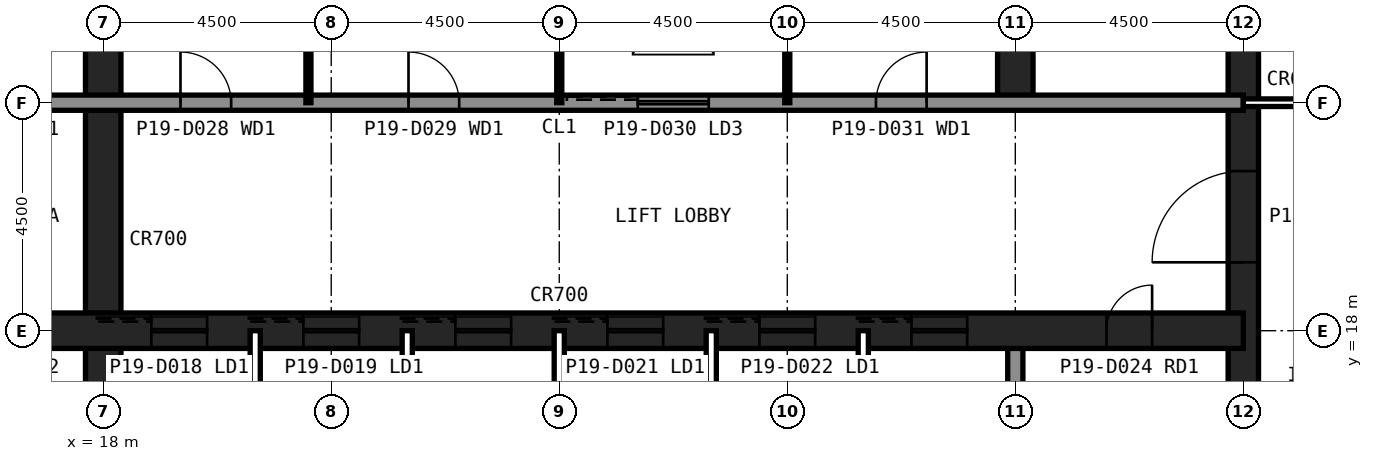
"""IFC4 building model, lengths in metres.
Left out: names, types, materials, properties, quantities, classifications, styles, units other than length and angle.
Written with IfcOpenShell. Run it as: python <this file> out.ifc"""

import sys

from ifc_helpers import new_model, si_unit, direction, frame, frame_2d, origin, place, context, subcontext, project, spatial, rectangle, extrude, element, fill, save


model = new_model("IFC4")
c1 = context("Model", 3, precision=1e-05, world=origin(), true_north=direction((0.0, 1.0)))
c2 = subcontext(c1, "Body", "Model", "MODEL_VIEW")
j1 = project(units=[si_unit("LENGTHUNIT", "METRE"), si_unit("PLANEANGLEUNIT", "RADIAN")], contexts=[c1])
p1 = place(None, origin())
s1 = spatial("IfcSite", under=j1, at=p1, CompositionType="ELEMENT")
p2 = place(p1, origin())
s2 = spatial("IfcBuilding", under=s1, at=p2, CompositionType="ELEMENT")
p3 = place(p2, frame((0.0, 0.0, 79.4)))
s3 = spatial("IfcBuildingStorey", under=s2, at=p3, CompositionType="ELEMENT", Elevation=79.4)
p4 = place(p3, frame((40.5, 13.5, 0.0), z_axis=(0.0, 0.0, 1.0), x_axis=(0.0, 1.0, 0.0)))
e1 = element("IfcWall", 1, at=p4, inside=s3, PredefinedType="SHEAR", context=c2, shape_type="SweptSolid", body=[
    extrude(rectangle(XDim=27.0, YDim=0.6, at=frame_2d((13.5, 0.0))), origin(), (0.0, 0.0, 1.0), 4.2),
])
p5 = place(p4, frame((5.85, 0.0, 0.0)))
e2 = element("IfcOpeningElement", 2, at=p5, cuts=e1, PredefinedType="OPENING", context=c2, shape_type="SweptSolid", body=[
    extrude(rectangle(XDim=1.8, YDim=2.1, at=frame_2d((0.9, 1.05))), frame((0.0, 0.31, 0.0), z_axis=(0.0, -1.0, 0.0), x_axis=(1.0, 0.0, 0.0)), (0.0, 0.0, 1.0), 0.62),
])
p6 = place(p4, frame((19.65, 0.0, 0.0)))
e3 = element("IfcOpeningElement", 3, at=p6, cuts=e1, PredefinedType="OPENING", context=c2, shape_type="SweptSolid", body=[
    extrude(rectangle(XDim=1.2, YDim=2.1, at=frame_2d((0.6, 1.05))), frame((0.0, 0.31, 0.0), z_axis=(0.0, -1.0, 0.0), x_axis=(1.0, 0.0, 0.0)), (0.0, 0.0, 1.0), 0.62),
])
p7 = place(p3, frame((18.0, 13.5, 0.0), z_axis=(0.0, 0.0, 1.0), x_axis=(0.0, 1.0, 0.0)))
e4 = element("IfcWall", 4, at=p7, inside=s3, PredefinedType="SHEAR", context=c2, shape_type="SweptSolid", body=[
    extrude(rectangle(XDim=18.0, YDim=0.7, at=frame_2d((9.0, 0.0))), origin(), (0.0, 0.0, 1.0), 4.2),
])
p8 = place(p3, frame((36.0, 13.5, 0.0), z_axis=(0.0, 0.0, 1.0), x_axis=(0.0, 1.0, 0.0)))
e5 = element("IfcWall", 5, at=p8, inside=s3, PredefinedType="SOLIDWALL", context=c2, shape_type="SweptSolid", body=[
    extrude(rectangle(XDim=4.5, YDim=0.3, at=frame_2d((2.25, 0.0))), origin(), (0.0, 0.0, 1.0), 4.04),
])
p9 = place(p3, frame((36.0, 22.5, 0.0), z_axis=(0.0, 0.0, 1.0), x_axis=(0.0, 1.0, 0.0)))
e6 = element("IfcWall", 6, at=p9, inside=s3, PredefinedType="SHEAR", context=c2, shape_type="SweptSolid", body=[
    extrude(rectangle(XDim=18.0, YDim=0.7, at=frame_2d((9.0, 0.0))), origin(), (0.0, 0.0, 1.0), 4.2),
])
p10 = place(p3, frame((13.5, 18.0, 0.0), z_axis=(0.0, 0.0, 1.0), x_axis=(1.0, 0.0, 0.0)))
e7 = element("IfcWall", 7, at=p10, inside=s3, PredefinedType="SHEAR", context=c2, shape_type="SweptSolid", body=[
    extrude(rectangle(XDim=27.0, YDim=0.7, at=frame_2d((13.5, 0.0))), origin(), (0.0, 0.0, 1.0), 4.2),
])
p11 = place(p10, frame((24.3, 0.0, 0.0)))
e8 = element("IfcOpeningElement", 8, at=p11, cuts=e7, PredefinedType="OPENING", context=c2, shape_type="SweptSolid", body=[
    extrude(rectangle(XDim=0.9, YDim=2.1, at=frame_2d((0.45, 1.05))), frame((0.0, 0.36, 0.0), z_axis=(0.0, -1.0, 0.0), x_axis=(1.0, 0.0, 0.0)), (0.0, 0.0, 1.0), 0.72),
])
p12 = place(p10, frame((5.45, 0.0, 0.0)))
e9 = element("IfcOpeningElement", 9, at=p12, cuts=e7, PredefinedType="OPENING", context=c2, shape_type="SweptSolid", body=[
    extrude(rectangle(XDim=1.1, YDim=2.1, at=frame_2d((0.55, 1.05))), frame((0.0, 0.36, 0.0), z_axis=(0.0, -1.0, 0.0), x_axis=(1.0, 0.0, 0.0)), (0.0, 0.0, 1.0), 0.72),
])
p13 = place(p10, frame((8.45, 0.0, 0.0)))
e10 = element("IfcOpeningElement", 10, at=p13, cuts=e7, PredefinedType="OPENING", context=c2, shape_type="SweptSolid", body=[
    extrude(rectangle(XDim=1.1, YDim=2.1, at=frame_2d((0.55, 1.05))), frame((0.0, 0.36, 0.0), z_axis=(0.0, -1.0, 0.0), x_axis=(1.0, 0.0, 0.0)), (0.0, 0.0, 1.0), 0.72),
])
p14 = place(p10, frame((11.45, 0.0, 0.0)))
e11 = element("IfcOpeningElement", 11, at=p14, cuts=e7, PredefinedType="OPENING", context=c2, shape_type="SweptSolid", body=[
    extrude(rectangle(XDim=1.1, YDim=2.1, at=frame_2d((0.55, 1.05))), frame((0.0, 0.36, 0.0), z_axis=(0.0, -1.0, 0.0), x_axis=(1.0, 0.0, 0.0)), (0.0, 0.0, 1.0), 0.72),
])
p15 = place(p10, frame((14.45, 0.0, 0.0)))
e12 = element("IfcOpeningElement", 12, at=p15, cuts=e7, PredefinedType="OPENING", context=c2, shape_type="SweptSolid", body=[
    extrude(rectangle(XDim=1.1, YDim=2.1, at=frame_2d((0.55, 1.05))), frame((0.0, 0.36, 0.0), z_axis=(0.0, -1.0, 0.0), x_axis=(1.0, 0.0, 0.0)), (0.0, 0.0, 1.0), 0.72),
])
p16 = place(p10, frame((17.45, 0.0, 0.0)))
e13 = element("IfcOpeningElement", 13, at=p16, cuts=e7, PredefinedType="OPENING", context=c2, shape_type="SweptSolid", body=[
    extrude(rectangle(XDim=1.1, YDim=2.1, at=frame_2d((0.55, 1.05))), frame((0.0, 0.36, 0.0), z_axis=(0.0, -1.0, 0.0), x_axis=(1.0, 0.0, 0.0)), (0.0, 0.0, 1.0), 0.72),
])
p17 = place(p10, frame((20.45, 0.0, 0.0)))
e14 = element("IfcOpeningElement", 14, at=p17, cuts=e7, PredefinedType="OPENING", context=c2, shape_type="SweptSolid", body=[
    extrude(rectangle(XDim=1.1, YDim=2.1, at=frame_2d((0.55, 1.05))), frame((0.0, 0.36, 0.0), z_axis=(0.0, -1.0, 0.0), x_axis=(1.0, 0.0, 0.0)), (0.0, 0.0, 1.0), 0.72),
])
p18 = place(p10, frame((1.6, 0.0, 0.0)))
e15 = element("IfcOpeningElement", 15, at=p18, cuts=e7, PredefinedType="OPENING", context=c2, shape_type="SweptSolid", body=[
    extrude(rectangle(XDim=1.3, YDim=2.2, at=frame_2d((0.65, 1.1))), frame((0.0, 0.36, 0.0), z_axis=(0.0, -1.0, 0.0), x_axis=(1.0, 0.0, 0.0)), (0.0, 0.0, 1.0), 0.72),
])
p19 = place(p3, frame((13.5, 22.5, 0.0), z_axis=(0.0, 0.0, 1.0), x_axis=(1.0, 0.0, 0.0)))
e16 = element("IfcWall", 16, at=p19, inside=s3, PredefinedType="SOLIDWALL", context=c2, shape_type="SweptSolid", body=[
    extrude(rectangle(XDim=27.0, YDim=0.3, at=frame_2d((13.5, 0.0))), origin(), (0.0, 0.0, 1.0), 4.04),
])
p20 = place(p19, frame((1.65, 0.0, 0.0)))
e17 = element("IfcOpeningElement", 17, at=p20, cuts=e16, PredefinedType="OPENING", context=c2, shape_type="SweptSolid", body=[
    extrude(rectangle(XDim=1.2, YDim=2.1, at=frame_2d((0.6, 1.05))), frame((0.0, 0.16, 0.0), z_axis=(0.0, -1.0, 0.0), x_axis=(1.0, 0.0, 0.0)), (0.0, 0.0, 1.0), 0.32),
])
p21 = place(p19, frame((6.025, 0.0, 0.0)))
e18 = element("IfcOpeningElement", 18, at=p21, cuts=e16, PredefinedType="OPENING", context=c2, shape_type="SweptSolid", body=[
    extrude(rectangle(XDim=1.0, YDim=2.1, at=frame_2d((0.5, 1.05))), frame((0.0, 0.16, 0.0), z_axis=(0.0, -1.0, 0.0), x_axis=(1.0, 0.0, 0.0)), (0.0, 0.0, 1.0), 0.32),
])
p22 = place(p19, frame((10.525, 0.0, 0.0)))
e19 = element("IfcOpeningElement", 19, at=p22, cuts=e16, PredefinedType="OPENING", context=c2, shape_type="SweptSolid", body=[
    extrude(rectangle(XDim=1.0, YDim=2.1, at=frame_2d((0.5, 1.05))), frame((0.0, 0.16, 0.0), z_axis=(0.0, -1.0, 0.0), x_axis=(1.0, 0.0, 0.0)), (0.0, 0.0, 1.0), 0.32),
])
p23 = place(p19, frame((19.75, 0.0, 0.0)))
e20 = element("IfcOpeningElement", 20, at=p23, cuts=e16, PredefinedType="OPENING", context=c2, shape_type="SweptSolid", body=[
    extrude(rectangle(XDim=1.0, YDim=2.1, at=frame_2d((0.5, 1.05))), frame((0.0, 0.16, 0.0), z_axis=(0.0, -1.0, 0.0), x_axis=(1.0, 0.0, 0.0)), (0.0, 0.0, 1.0), 0.32),
])
p24 = place(p19, frame((15.05, 0.0, 0.0)))
e21 = element("IfcOpeningElement", 21, at=p24, cuts=e16, PredefinedType="OPENING", context=c2, shape_type="SweptSolid", body=[
    extrude(rectangle(XDim=1.4, YDim=2.4, at=frame_2d((0.7, 1.2))), frame((0.0, 0.16, 0.0), z_axis=(0.0, -1.0, 0.0), x_axis=(1.0, 0.0, 0.0)), (0.0, 0.0, 1.0), 0.32),
])
for number, where, z_axis, x_axis in (
    (22, (21.0, 13.5, 0.0), (0.0, 0.0, 1.0), (0.0, 1.0, 0.0)),
    (23, (24.0, 13.5, 0.0), (0.0, 0.0, 1.0), (0.0, 1.0, 0.0)),
    (24, (27.0, 13.5, 0.0), (0.0, 0.0, 1.0), (0.0, 1.0, 0.0)),
    (25, (30.0, 13.5, 0.0), (0.0, 0.0, 1.0), (0.0, 1.0, 0.0)),
    (26, (33.0, 13.5, 0.0), (0.0, 0.0, 1.0), (0.0, 1.0, 0.0)),
):
    element("IfcWall", number, at=place(p3, frame(where, z_axis=z_axis, x_axis=x_axis)), inside=s3, PredefinedType="PARTITIONING", context=c2, shape_type="SweptSolid", body=[
        extrude(rectangle(XDim=4.5, YDim=0.2, at=frame_2d((2.25, 0.0))), origin(), (0.0, 0.0, 1.0), 4.04),
    ])
for number, where, z_axis, x_axis in (
    (27, (22.05, 22.5, 0.0), (0.0, 0.0, 1.0), (0.0, 1.0, 0.0)),
    (28, (27.0, 22.5, 0.0), (0.0, 0.0, 1.0), (0.0, 1.0, 0.0)),
    (29, (31.5, 22.5, 0.0), (0.0, 0.0, 1.0), (0.0, 1.0, 0.0)),
):
    element("IfcWall", number, at=place(p3, frame(where, z_axis=z_axis, x_axis=x_axis)), inside=s3, PredefinedType="PLUMBINGWALL", context=c2, shape_type="SweptSolid", body=[
        extrude(rectangle(XDim=9.0, YDim=0.1, at=frame_2d((4.5, 0.0))), origin(), (0.0, 0.0, 1.0), 4.04),
    ])
p25 = place(p3, frame((40.5, 22.5, 0.0), z_axis=(0.0, 0.0, 1.0), x_axis=(1.0, 0.0, 0.0)))
e30 = element("IfcWall", 30, at=p25, inside=s3, PredefinedType="PARTITIONING", context=c2, shape_type="SweptSolid", body=[
    extrude(rectangle(XDim=3.6, YDim=0.15, at=frame_2d((1.8, 0.0))), origin(), (0.0, 0.0, 1.0), 3.189),
])
p26 = place(p5, origin())
e31 = element("IfcDoor", 31, at=p26, inside=s3, OperationType="SINGLE_SWING_LEFT", PredefinedType="DOOR", context=c2, shape_type="SweptSolid", body=[
    extrude(rectangle(XDim=1.8, YDim=2.1, at=frame_2d((0.9, 1.05))), frame((0.0, 0.025, 0.0), z_axis=(0.0, -1.0, 0.0), x_axis=(1.0, 0.0, 0.0)), (0.0, 0.0, 1.0), 0.05),
])
fill(e2, e31)
p27 = place(p21, origin())
e32 = element("IfcDoor", 32, at=p27, inside=s3, OperationType="SINGLE_SWING_LEFT", PredefinedType="DOOR", context=c2, shape_type="SweptSolid", body=[
    extrude(rectangle(XDim=1.0, YDim=2.1, at=frame_2d((0.5, 1.05))), frame((0.0, 0.025, 0.0), z_axis=(0.0, -1.0, 0.0), x_axis=(1.0, 0.0, 0.0)), (0.0, 0.0, 1.0), 0.05),
])
fill(e18, e32)
p28 = place(p22, origin())
e33 = element("IfcDoor", 33, at=p28, inside=s3, OperationType="SINGLE_SWING_LEFT", PredefinedType="DOOR", context=c2, shape_type="SweptSolid", body=[
    extrude(rectangle(XDim=1.0, YDim=2.1, at=frame_2d((0.5, 1.05))), frame((0.0, 0.025, 0.0), z_axis=(0.0, -1.0, 0.0), x_axis=(1.0, 0.0, 0.0)), (0.0, 0.0, 1.0), 0.05),
])
fill(e19, e33)
p29 = place(p23, origin())
e34 = element("IfcDoor", 34, at=p29, inside=s3, OperationType="SINGLE_SWING_RIGHT", PredefinedType="DOOR", context=c2, shape_type="SweptSolid", body=[
    extrude(rectangle(XDim=1.0, YDim=2.1, at=frame_2d((0.5, 1.05))), frame((0.0, 0.025, 0.0), z_axis=(0.0, -1.0, 0.0), x_axis=(1.0, 0.0, 0.0)), (0.0, 0.0, 1.0), 0.05),
])
fill(e20, e34)
p30 = place(p11, origin())
e35 = element("IfcDoor", 35, at=p30, inside=s3, OperationType="SINGLE_SWING_RIGHT", PredefinedType="DOOR", context=c2, shape_type="SweptSolid", body=[
    extrude(rectangle(XDim=0.9, YDim=2.1, at=frame_2d((0.45, 1.05))), frame((0.0, 0.025, 0.0), z_axis=(0.0, -1.0, 0.0), x_axis=(1.0, 0.0, 0.0)), (0.0, 0.0, 1.0), 0.05),
])
fill(e8, e35)
p31 = place(p12, origin())
e36 = element("IfcDoor", 36, at=p31, inside=s3, OperationType="SLIDING_TO_LEFT", PredefinedType="DOOR", context=c2, shape_type="SweptSolid", body=[
    extrude(rectangle(XDim=1.1, YDim=2.1, at=frame_2d((0.55, 1.05))), frame((0.0, 0.025, 0.0), z_axis=(0.0, -1.0, 0.0), x_axis=(1.0, 0.0, 0.0)), (0.0, 0.0, 1.0), 0.05),
])
fill(e9, e36)
p32 = place(p13, origin())
e37 = element("IfcDoor", 37, at=p32, inside=s3, OperationType="SLIDING_TO_LEFT", PredefinedType="DOOR", context=c2, shape_type="SweptSolid", body=[
    extrude(rectangle(XDim=1.1, YDim=2.1, at=frame_2d((0.55, 1.05))), frame((0.0, 0.025, 0.0), z_axis=(0.0, -1.0, 0.0), x_axis=(1.0, 0.0, 0.0)), (0.0, 0.0, 1.0), 0.05),
])
fill(e10, e37)
p33 = place(p14, origin())
e38 = element("IfcDoor", 38, at=p33, inside=s3, OperationType="SLIDING_TO_LEFT", PredefinedType="DOOR", context=c2, shape_type="SweptSolid", body=[
    extrude(rectangle(XDim=1.1, YDim=2.1, at=frame_2d((0.55, 1.05))), frame((0.0, 0.025, 0.0), z_axis=(0.0, -1.0, 0.0), x_axis=(1.0, 0.0, 0.0)), (0.0, 0.0, 1.0), 0.05),
])
fill(e11, e38)
p34 = place(p15, origin())
e39 = element("IfcDoor", 39, at=p34, inside=s3, OperationType="SLIDING_TO_LEFT", PredefinedType="DOOR", context=c2, shape_type="SweptSolid", body=[
    extrude(rectangle(XDim=1.1, YDim=2.1, at=frame_2d((0.55, 1.05))), frame((0.0, 0.025, 0.0), z_axis=(0.0, -1.0, 0.0), x_axis=(1.0, 0.0, 0.0)), (0.0, 0.0, 1.0), 0.05),
])
fill(e12, e39)
p35 = place(p16, origin())
e40 = element("IfcDoor", 40, at=p35, inside=s3, OperationType="SLIDING_TO_LEFT", PredefinedType="DOOR", context=c2, shape_type="SweptSolid", body=[
    extrude(rectangle(XDim=1.1, YDim=2.1, at=frame_2d((0.55, 1.05))), frame((0.0, 0.025, 0.0), z_axis=(0.0, -1.0, 0.0), x_axis=(1.0, 0.0, 0.0)), (0.0, 0.0, 1.0), 0.05),
])
fill(e13, e40)
p36 = place(p17, origin())
e41 = element("IfcDoor", 41, at=p36, inside=s3, OperationType="SLIDING_TO_LEFT", PredefinedType="DOOR", context=c2, shape_type="SweptSolid", body=[
    extrude(rectangle(XDim=1.1, YDim=2.1, at=frame_2d((0.55, 1.05))), frame((0.0, 0.025, 0.0), z_axis=(0.0, -1.0, 0.0), x_axis=(1.0, 0.0, 0.0)), (0.0, 0.0, 1.0), 0.05),
])
fill(e14, e41)
p37 = place(p24, origin())
e42 = element("IfcDoor", 42, at=p37, inside=s3, OperationType="SLIDING_TO_LEFT", PredefinedType="DOOR", context=c2, shape_type="SweptSolid", body=[
    extrude(rectangle(XDim=1.4, YDim=2.4, at=frame_2d((0.7, 1.2))), frame((0.0, 0.025, 0.0), z_axis=(0.0, -1.0, 0.0), x_axis=(1.0, 0.0, 0.0)), (0.0, 0.0, 1.0), 0.05),
])
fill(e21, e42)
save(model, sys.argv[1])
